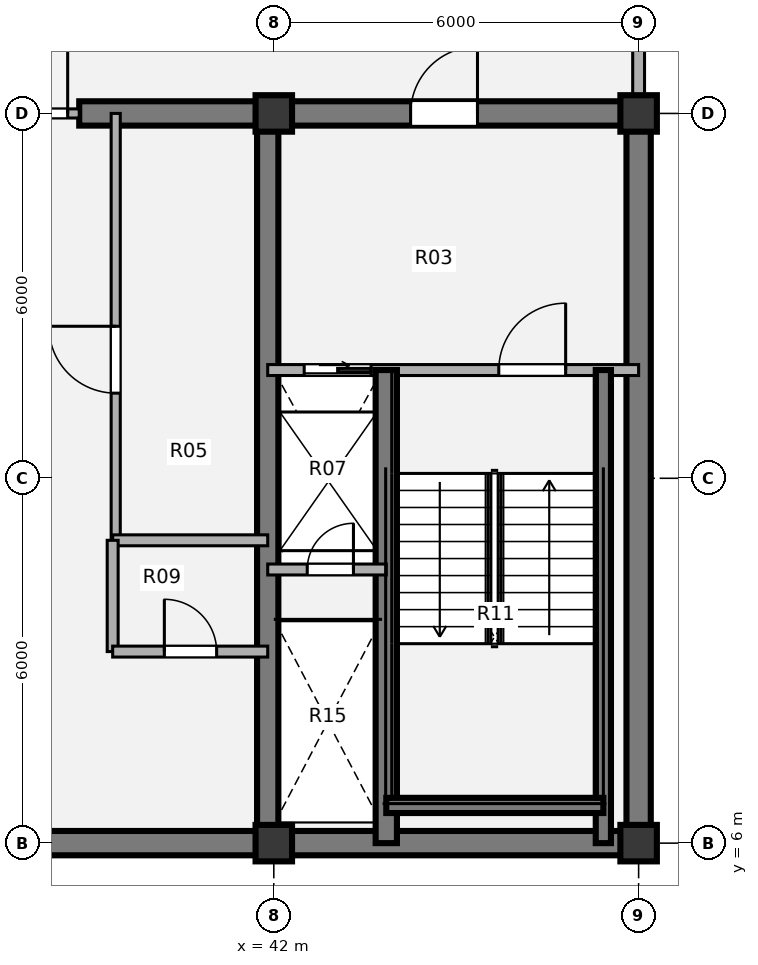
"""IFC4 building model, lengths in metres.
Left out: names, types, materials, properties, quantities, classifications, styles, units other than length and angle.
Written with IfcOpenShell. Run it as: python <this file> out.ifc"""

import sys

from ifc_helpers import new_model, si_unit, direction, frame, frame_2d, origin, origin_2d, place, context, subcontext, project, spatial, rectangle, extrude, source, transform, mapped, element, fill, save


model = new_model("IFC4")
c1 = context("Model", 3, precision=1e-05, world=origin(), true_north=direction((0.0, 1.0)))
c2 = subcontext(c1, "Body", "Model", "MODEL_VIEW")
j1 = project(units=[si_unit("LENGTHUNIT", "METRE"), si_unit("PLANEANGLEUNIT", "RADIAN")], contexts=[c1])
p1 = place(None, origin())
s1 = spatial("IfcSite", under=j1, at=p1, CompositionType="ELEMENT")
p2 = place(p1, origin())
s2 = spatial("IfcBuilding", under=s1, at=p2, CompositionType="ELEMENT")
p3 = place(p2, frame((0.0, 0.0, 303.84)))
s3 = spatial("IfcBuildingStorey", under=s2, at=p3, CompositionType="ELEMENT", Elevation=303.84)
m1 = source(origin(), c2, "Body", "SweptSolid", [
    extrude(rectangle(XDim=0.6, YDim=0.6, at=origin_2d()), origin(), (0.0, 0.0, 1.0), 3.96),
])
for number, where, z_axis, x_axis in (
    (1, (42.0, 6.0, 0.0), (0.0, 0.0, 1.0), (1.0, 0.0, 0.0)),
    (2, (48.0, 6.0, 0.0), (0.0, 0.0, 1.0), (1.0, 0.0, 0.0)),
    (3, (42.0, 18.0, 0.0), (0.0, 0.0, 1.0), (1.0, 0.0, 0.0)),
    (4, (48.0, 18.0, 0.0), (0.0, 0.0, 1.0), (1.0, 0.0, 0.0)),
):
    element("IfcColumn", number, at=place(p3, frame(where, z_axis=z_axis, x_axis=x_axis)), inside=s3, PredefinedType="COLUMN", context=c2, shape_type="MappedRepresentation", body=[
        mapped(m1, transform((0.0, 0.0, 0.0), x_axis=(1.0, 0.0, 0.0), y_axis=(0.0, 1.0, 0.0), z_axis=(0.0, 0.0, 1.0), scale=1.0)),
    ])
p4 = place(p3, frame((48.2, 6.0, 0.0), z_axis=(0.0, 0.0, 1.0), x_axis=(-1.0, 0.0, 0.0)))
e5 = element("IfcWall", 5, at=p4, inside=s3, PredefinedType="SHEAR", context=c2, shape_type="SweptSolid", body=[
    extrude(rectangle(XDim=24.4, YDim=0.4, at=frame_2d((12.2, 0.0))), origin(), (0.0, 0.0, 1.0), 3.96),
])
p5 = place(p3, frame((48.0, 18.0, 0.0), z_axis=(0.0, 0.0, 1.0), x_axis=(0.0, -1.0, 0.0)))
e6 = element("IfcWall", 6, at=p5, inside=s3, PredefinedType="SHEAR", context=c2, shape_type="SweptSolid", body=[
    extrude(rectangle(XDim=12.0, YDim=0.4, at=frame_2d((6.0, 0.0))), origin(), (0.0, 0.0, 1.0), 3.96),
])
p6 = place(p3, frame((38.8, 18.0, 0.0), z_axis=(0.0, 0.0, 1.0), x_axis=(1.0, 0.0, 0.0)))
e7 = element("IfcWall", 7, at=p6, inside=s3, PredefinedType="SHEAR", context=c2, shape_type="SweptSolid", body=[
    extrude(rectangle(XDim=9.4, YDim=0.4, at=frame_2d((4.7, 0.0))), origin(), (0.0, 0.0, 1.0), 3.96),
])
p7 = place(p6, frame((5.45, 0.0, 0.0)))
e8 = element("IfcOpeningElement", 8, at=p7, cuts=e7, PredefinedType="OPENING", context=c2, shape_type="SweptSolid", body=[
    extrude(rectangle(XDim=1.1, YDim=2.1, at=origin_2d()), frame((0.55, 0.21, 1.05), z_axis=(0.0, -1.0, 0.0), x_axis=(1.0, 0.0, 0.0)), (0.0, 0.0, 1.0), 0.42),
])
p8 = place(p3, frame((41.9, 18.0, 0.0), z_axis=(0.0, 0.0, 1.0), x_axis=(0.0, -1.0, 0.0)))
e9 = element("IfcWall", 9, at=p8, inside=s3, PredefinedType="SHEAR", context=c2, shape_type="SweptSolid", body=[
    extrude(rectangle(XDim=12.0, YDim=0.35, at=frame_2d((6.0, 0.0))), origin(), (0.0, 0.0, 1.0), 3.96),
])
p9 = place(p3, frame((48.0, 21.05, 0.0), z_axis=(0.0, 0.0, 1.0), x_axis=(0.0, -1.0, 0.0)))
e10 = element("IfcWall", 10, at=p9, inside=s3, PredefinedType="SOLIDWALL", context=c2, shape_type="SweptSolid", body=[
    extrude(rectangle(XDim=2.77, YDim=0.195, at=frame_2d((1.385, 0.0))), origin(), (0.0, 0.0, 1.0), 2.898),
])
p10 = place(p3, frame((39.4, 11.0, 0.0), z_axis=(0.0, 0.0, 1.0), x_axis=(0.0, 1.0, 0.0)))
e11 = element("IfcWall", 11, at=p10, inside=s3, PredefinedType="PARTITIONING", context=c2, shape_type="SweptSolid", body=[
    extrude(rectangle(XDim=7.0, YDim=0.15, at=frame_2d((3.5, 0.0))), origin(), (0.0, 0.0, 1.0), 3.68),
])
p11 = place(p10, frame((2.4, 0.0, 0.0)))
e12 = element("IfcOpeningElement", 12, at=p11, cuts=e11, PredefinedType="OPENING", context=c2, shape_type="SweptSolid", body=[
    extrude(rectangle(XDim=1.1, YDim=2.1, at=origin_2d()), frame((0.55, 0.085, 1.05), z_axis=(0.0, -1.0, 0.0), x_axis=(1.0, 0.0, 0.0)), (0.0, 0.0, 1.0), 0.17),
])
p12 = place(p3, frame((39.35, 10.98, 0.0), z_axis=(0.0, 0.0, 1.0), x_axis=(1.0, 0.0, 0.0)))
e13 = element("IfcWall", 13, at=p12, inside=s3, PredefinedType="PARTITIONING", context=c2, shape_type="SweptSolid", body=[
    extrude(rectangle(XDim=2.55, YDim=0.18, at=frame_2d((1.275, 0.0))), origin(), (0.0, 0.0, 1.0), 3.68),
])
p13 = place(p3, frame((39.35, 9.15, 0.0), z_axis=(0.0, 0.0, 1.0), x_axis=(0.0, 1.0, 0.0)))
e14 = element("IfcWall", 14, at=p13, inside=s3, PredefinedType="PARTITIONING", context=c2, shape_type="SweptSolid", body=[
    extrude(rectangle(XDim=1.83, YDim=0.18, at=frame_2d((0.915, 0.0))), origin(), (0.0, 0.0, 1.0), 3.68),
])
p14 = place(p3, frame((39.35, 9.15, 0.0), z_axis=(0.0, 0.0, 1.0), x_axis=(1.0, 0.0, 0.0)))
e15 = element("IfcWall", 15, at=p14, inside=s3, PredefinedType="PARTITIONING", context=c2, shape_type="SweptSolid", body=[
    extrude(rectangle(XDim=2.55, YDim=0.18, at=frame_2d((1.275, 0.0))), origin(), (0.0, 0.0, 1.0), 3.68),
])
p15 = place(p14, frame((0.85, 0.0, 0.0)))
e16 = element("IfcOpeningElement", 16, at=p15, cuts=e15, PredefinedType="OPENING", context=c2, shape_type="SweptSolid", body=[
    extrude(rectangle(XDim=0.86, YDim=2.1, at=origin_2d()), frame((0.43, 0.1, 1.05), z_axis=(0.0, -1.0, 0.0), x_axis=(1.0, 0.0, 0.0)), (0.0, 0.0, 1.0), 0.2),
])
p16 = place(p3, frame((33.2, 18.0, 0.0), z_axis=(0.0, 0.0, 1.0), x_axis=(1.0, 0.0, 0.0)))
e17 = element("IfcWall", 17, at=p16, inside=s3, PredefinedType="PARTITIONING", context=c2, shape_type="SweptSolid", body=[
    extrude(rectangle(XDim=5.6, YDim=0.15, at=frame_2d((2.8, 0.0))), origin(), (0.0, 0.0, 1.0), 2.695),
])
p17 = place(p16, frame((0.19, 0.0, 0.0)))
e18 = element("IfcOpeningElement", 18, at=p17, cuts=e17, PredefinedType="OPENING", context=c2, shape_type="SweptSolid", body=[
    extrude(rectangle(XDim=1.1, YDim=2.1, at=origin_2d()), frame((0.55, 0.085, 1.05), z_axis=(0.0, -1.0, 0.0), x_axis=(1.0, 0.0, 0.0)), (0.0, 0.0, 1.0), 0.17),
])
p18 = place(p16, frame((4.31, 0.0, 0.0)))
e19 = element("IfcOpeningElement", 19, at=p18, cuts=e17, PredefinedType="OPENING", context=c2, shape_type="SweptSolid", body=[
    extrude(rectangle(XDim=1.1, YDim=2.1, at=origin_2d()), frame((0.55, 0.085, 1.05), z_axis=(0.0, -1.0, 0.0), x_axis=(1.0, 0.0, 0.0)), (0.0, 0.0, 1.0), 0.17),
])
p19 = place(p3, frame((41.9, 13.78, 0.0), z_axis=(0.0, 0.0, 1.0), x_axis=(1.0, 0.0, 0.0)))
e20 = element("IfcWall", 20, at=p19, inside=s3, PredefinedType="PARTITIONING", context=c2, shape_type="SweptSolid", body=[
    extrude(rectangle(XDim=6.1, YDim=0.18, at=frame_2d((3.05, 0.0))), origin(), (0.0, 0.0, 1.0), 3.68),
])
p20 = place(p19, frame((0.6, 0.0, 0.0)))
e21 = element("IfcOpeningElement", 21, at=p20, cuts=e20, PredefinedType="OPENING", context=c2, shape_type="SweptSolid", body=[
    extrude(rectangle(XDim=1.1, YDim=2.1, at=origin_2d()), frame((0.55, 0.1, 1.05), z_axis=(0.0, -1.0, 0.0), x_axis=(1.0, 0.0, 0.0)), (0.0, 0.0, 1.0), 0.2),
])
p21 = place(p19, frame((3.8, 0.0, 0.0)))
e22 = element("IfcOpeningElement", 22, at=p21, cuts=e20, PredefinedType="OPENING", context=c2, shape_type="SweptSolid", body=[
    extrude(rectangle(XDim=1.1, YDim=2.1, at=origin_2d()), frame((0.55, 0.1, 1.05), z_axis=(0.0, -1.0, 0.0), x_axis=(1.0, 0.0, 0.0)), (0.0, 0.0, 1.0), 0.2),
])
p22 = place(p3, frame((43.85, 6.0, 0.0), z_axis=(0.0, 0.0, 1.0), x_axis=(0.0, 1.0, 0.0)))
e23 = element("IfcWall", 23, at=p22, inside=s3, PredefinedType="SHEAR", context=c2, shape_type="SweptSolid", body=[
    extrude(rectangle(XDim=7.78, YDim=0.35, at=frame_2d((3.89, 0.0))), origin(), (0.0, 0.0, 1.0), 4.03),
])
p23 = place(p3, frame((47.42, 6.0, 0.0), z_axis=(0.0, 0.0, 1.0), x_axis=(0.0, 1.0, 0.0)))
e24 = element("IfcWall", 24, at=p23, inside=s3, PredefinedType="SHEAR", context=c2, shape_type="SweptSolid", body=[
    extrude(rectangle(XDim=7.78, YDim=0.25, at=frame_2d((3.89, 0.0))), origin(), (0.0, 0.0, 1.0), 4.03),
])
p24 = place(p3, frame((43.85, 6.62, 0.0), z_axis=(0.0, 0.0, 1.0), x_axis=(1.0, 0.0, 0.0)))
e25 = element("IfcWall", 25, at=p24, inside=s3, PredefinedType="SHEAR", context=c2, shape_type="SweptSolid", body=[
    extrude(rectangle(XDim=3.57, YDim=0.25, at=frame_2d((1.785, 0.0))), origin(), (0.0, 0.0, 1.0), 4.03),
])
p25 = place(p3, frame((41.9, 10.5, 0.0), z_axis=(0.0, 0.0, 1.0), x_axis=(1.0, 0.0, 0.0)))
e26 = element("IfcWall", 26, at=p25, inside=s3, PredefinedType="PARTITIONING", context=c2, shape_type="SweptSolid", body=[
    extrude(rectangle(XDim=1.95, YDim=0.18, at=frame_2d((0.975, 0.0))), origin(), (0.0, 0.0, 1.0), 3.68),
])
p26 = place(p25, frame((0.65, 0.0, 0.0)))
e27 = element("IfcOpeningElement", 27, at=p26, cuts=e26, PredefinedType="OPENING", context=c2, shape_type="SweptSolid", body=[
    extrude(rectangle(XDim=0.76, YDim=2.05, at=origin_2d()), frame((0.38, 0.1, 1.025), z_axis=(0.0, -1.0, 0.0), x_axis=(1.0, 0.0, 0.0)), (0.0, 0.0, 1.0), 0.2),
])
m2 = source(origin(), c2, "Body", "SweptSolid", [
    extrude(rectangle(XDim=1.1, YDim=2.1, at=origin_2d()), frame((0.55, 0.025, 1.05), z_axis=(0.0, -1.0, 0.0), x_axis=(1.0, 0.0, 0.0)), (0.0, 0.0, 1.0), 0.05),
])
p27 = place(p11, origin())
e28 = element("IfcDoor", 28, at=p27, inside=s3, OperationType="SINGLE_SWING_RIGHT", PredefinedType="DOOR", context=c2, shape_type="MappedRepresentation", body=[
    mapped(m2, transform((0.0, 0.0, 0.0), x_axis=(1.0, 0.0, 0.0), y_axis=(0.0, 1.0, 0.0), z_axis=(0.0, 0.0, 1.0), scale=1.0)),
])
fill(e12, e28)
m3 = source(origin(), c2, "Body", "SweptSolid", [
    extrude(rectangle(XDim=0.86, YDim=2.1, at=origin_2d()), frame((0.43, 0.025, 1.05), z_axis=(0.0, -1.0, 0.0), x_axis=(1.0, 0.0, 0.0)), (0.0, 0.0, 1.0), 0.05),
])
p28 = place(p15, origin())
e29 = element("IfcDoor", 29, at=p28, inside=s3, OperationType="SINGLE_SWING_LEFT", PredefinedType="DOOR", context=c2, shape_type="MappedRepresentation", body=[
    mapped(m3, transform((0.0, 0.0, 0.0), x_axis=(1.0, 0.0, 0.0), y_axis=(0.0, 1.0, 0.0), z_axis=(0.0, 0.0, 1.0), scale=1.0)),
])
fill(e16, e29)
m4 = source(origin(), c2, "Body", "SweptSolid", [
    extrude(rectangle(XDim=1.1, YDim=2.1, at=origin_2d()), frame((0.55, 0.025, 1.05), z_axis=(0.0, -1.0, 0.0), x_axis=(1.0, 0.0, 0.0)), (0.0, 0.0, 1.0), 0.05),
])
p29 = place(p18, origin())
e30 = element("IfcDoor", 30, at=p29, inside=s3, OperationType="SINGLE_SWING_RIGHT", PredefinedType="DOOR", context=c2, shape_type="MappedRepresentation", body=[
    mapped(m4, transform((0.0, 0.0, 0.0), x_axis=(1.0, 0.0, 0.0), y_axis=(0.0, 1.0, 0.0), z_axis=(0.0, 0.0, 1.0), scale=1.0)),
])
fill(e19, e30)
m5 = source(origin(), c2, "Body", "SweptSolid", [
    extrude(rectangle(XDim=1.1, YDim=2.1, at=origin_2d()), frame((0.55, 0.025, 1.05), z_axis=(0.0, -1.0, 0.0), x_axis=(1.0, 0.0, 0.0)), (0.0, 0.0, 1.0), 0.05),
])
p30 = place(p20, origin())
e31 = element("IfcDoor", 31, at=p30, inside=s3, OperationType="SLIDING_TO_RIGHT", PredefinedType="DOOR", context=c2, shape_type="MappedRepresentation", body=[
    mapped(m5, transform((0.0, 0.0, 0.0), x_axis=(1.0, 0.0, 0.0), y_axis=(0.0, 1.0, 0.0), z_axis=(0.0, 0.0, 1.0), scale=1.0)),
])
fill(e21, e31)
m6 = source(origin(), c2, "Body", "SweptSolid", [
    extrude(rectangle(XDim=1.1, YDim=2.1, at=origin_2d()), frame((0.55, 0.025, 1.05), z_axis=(0.0, -1.0, 0.0), x_axis=(1.0, 0.0, 0.0)), (0.0, 0.0, 1.0), 0.05),
])
p31 = place(p21, origin())
e32 = element("IfcDoor", 32, at=p31, inside=s3, OperationType="SINGLE_SWING_RIGHT", PredefinedType="DOOR", context=c2, shape_type="MappedRepresentation", body=[
    mapped(m6, transform((0.0, 0.0, 0.0), x_axis=(1.0, 0.0, 0.0), y_axis=(0.0, 1.0, 0.0), z_axis=(0.0, 0.0, 1.0), scale=1.0)),
])
fill(e22, e32)
m7 = source(origin(), c2, "Body", "SweptSolid", [
    extrude(rectangle(XDim=0.76, YDim=2.05, at=origin_2d()), frame((0.38, 0.025, 1.025), z_axis=(0.0, -1.0, 0.0), x_axis=(1.0, 0.0, 0.0)), (0.0, 0.0, 1.0), 0.05),
])
p32 = place(p26, origin())
e33 = element("IfcDoor", 33, at=p32, inside=s3, OperationType="SINGLE_SWING_RIGHT", PredefinedType="DOOR", context=c2, shape_type="MappedRepresentation", body=[
    mapped(m7, transform((0.0, 0.0, 0.0), x_axis=(1.0, 0.0, 0.0), y_axis=(0.0, 1.0, 0.0), z_axis=(0.0, 0.0, 1.0), scale=1.0)),
])
fill(e27, e33)
p33 = place(p7, origin())
e34 = element("IfcDoor", 34, at=p33, inside=s3, OperationType="SINGLE_SWING_RIGHT", PredefinedType="DOOR", context=c2, shape_type="MappedRepresentation", body=[
    mapped(m4, transform((0.0, 0.0, 0.0), x_axis=(1.0, 0.0, 0.0), y_axis=(0.0, 1.0, 0.0), z_axis=(0.0, 0.0, 1.0), scale=1.0)),
])
fill(e8, e34)
save(model, sys.argv[1])
